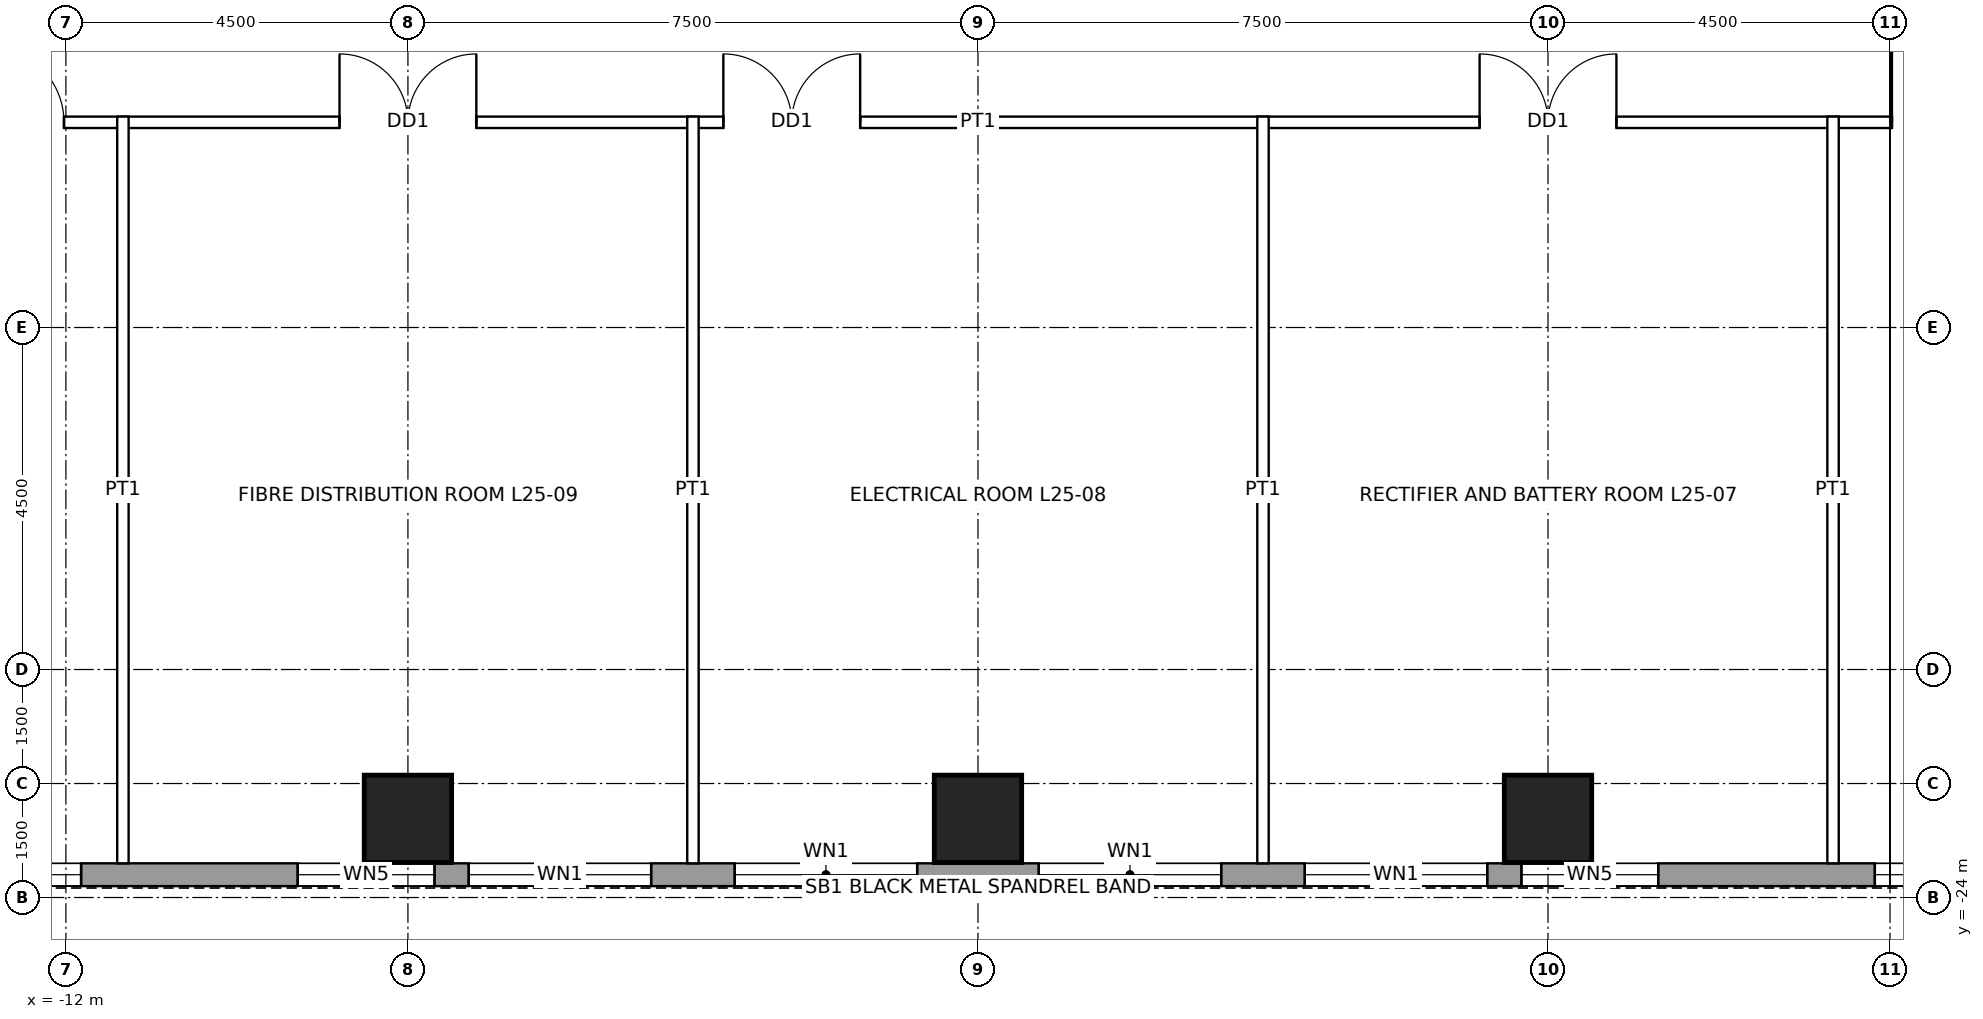
"""IFC4 building model, lengths in metres.
Left out: names, types, materials, properties, quantities, classifications, styles, units other than length and angle.
Written with IfcOpenShell. Run it as: python <this file> out.ifc"""

import sys

from ifc_helpers import new_model, si_unit, direction, frame, frame_2d, origin, origin_2d, place, context, subcontext, project, spatial, rectangle, hollow_rectangle, extrude, element, fill, save


model = new_model("IFC4")
c1 = context("Model", 3, precision=1e-05, world=origin(), true_north=direction((0.0, 1.0)))
c2 = subcontext(c1, "Body", "Model", "MODEL_VIEW")
j1 = project(units=[si_unit("LENGTHUNIT", "METRE"), si_unit("PLANEANGLEUNIT", "RADIAN")], contexts=[c1])
p1 = place(None, origin())
s1 = spatial("IfcSite", under=j1, at=p1, CompositionType="ELEMENT")
p2 = place(p1, origin())
s2 = spatial("IfcBuilding", under=s1, at=p2, CompositionType="ELEMENT")
p3 = place(p2, frame((0.0, 0.0, 126.9)))
s3 = spatial("IfcBuildingStorey", under=s2, at=p3, CompositionType="ELEMENT", Elevation=126.9)
for number, where, z_axis, x_axis in (
    (1, (7.5, -22.965, 0.0), (0.0, 0.0, 1.0), (1.0, 0.0, 0.0)),
    (2, (0.0, -22.965, 0.0), (0.0, 0.0, 1.0), (1.0, 0.0, 0.0)),
    (3, (-7.5, -22.965, 0.0), (0.0, 0.0, 1.0), (1.0, 0.0, 0.0)),
):
    element("IfcColumn", number, at=place(p3, frame(where, z_axis=z_axis, x_axis=x_axis)), inside=s3, PredefinedType="COLUMN", context=c2, shape_type="SweptSolid", body=[
        extrude(hollow_rectangle(XDim=1.15, YDim=1.15, WallThickness=0.075, at=origin_2d()), origin(), (0.0, 0.0, 1.0), 4.5),
    ])
p4 = place(p3, frame((16.2, -23.7, 0.0), z_axis=(0.0, 0.0, 1.0), x_axis=(-1.0, 0.0, 0.0)))
e4 = element("IfcWall", 4, at=p4, inside=s3, PredefinedType="SOLIDWALL", context=c2, shape_type="SweptSolid", body=[
    extrude(rectangle(XDim=32.4, YDim=0.3, at=frame_2d((16.2, 0.0))), origin(), (0.0, 0.0, 1.0), 4.3),
])
p5 = place(p4, frame((2.0, 0.0, 1.0)))
e5 = element("IfcOpeningElement", 5, at=p5, cuts=e4, PredefinedType="OPENING", context=c2, shape_type="SweptSolid", body=[
    extrude(rectangle(XDim=2.4, YDim=1.2, at=frame_2d((1.2, 0.6))), frame((0.0, 0.16, 0.0), z_axis=(0.0, -1.0, 0.0), x_axis=(1.0, 0.0, 0.0)), (0.0, 0.0, 1.0), 0.32),
])
p6 = place(p4, frame((7.25, 0.0, 1.0)))
e6 = element("IfcOpeningElement", 6, at=p6, cuts=e4, PredefinedType="OPENING", context=c2, shape_type="SweptSolid", body=[
    extrude(rectangle(XDim=1.8, YDim=1.2, at=frame_2d((0.9, 0.6))), frame((0.0, 0.16, 0.0), z_axis=(0.0, -1.0, 0.0), x_axis=(1.0, 0.0, 0.0)), (0.0, 0.0, 1.0), 0.32),
])
p7 = place(p4, frame((9.5, 0.0, 1.0)))
e7 = element("IfcOpeningElement", 7, at=p7, cuts=e4, PredefinedType="OPENING", context=c2, shape_type="SweptSolid", body=[
    extrude(rectangle(XDim=2.4, YDim=1.2, at=frame_2d((1.2, 0.6))), frame((0.0, 0.16, 0.0), z_axis=(0.0, -1.0, 0.0), x_axis=(1.0, 0.0, 0.0)), (0.0, 0.0, 1.0), 0.32),
])
p8 = place(p4, frame((13.0, 0.0, 1.0)))
e8 = element("IfcOpeningElement", 8, at=p8, cuts=e4, PredefinedType="OPENING", context=c2, shape_type="SweptSolid", body=[
    extrude(rectangle(XDim=2.4, YDim=1.2, at=frame_2d((1.2, 0.6))), frame((0.0, 0.16, 0.0), z_axis=(0.0, -1.0, 0.0), x_axis=(1.0, 0.0, 0.0)), (0.0, 0.0, 1.0), 0.32),
])
p9 = place(p4, frame((17.0, 0.0, 1.0)))
e9 = element("IfcOpeningElement", 9, at=p9, cuts=e4, PredefinedType="OPENING", context=c2, shape_type="SweptSolid", body=[
    extrude(rectangle(XDim=2.4, YDim=1.2, at=frame_2d((1.2, 0.6))), frame((0.0, 0.16, 0.0), z_axis=(0.0, -1.0, 0.0), x_axis=(1.0, 0.0, 0.0)), (0.0, 0.0, 1.0), 0.32),
])
p10 = place(p4, frame((20.5, 0.0, 1.0)))
e10 = element("IfcOpeningElement", 10, at=p10, cuts=e4, PredefinedType="OPENING", context=c2, shape_type="SweptSolid", body=[
    extrude(rectangle(XDim=2.4, YDim=1.2, at=frame_2d((1.2, 0.6))), frame((0.0, 0.16, 0.0), z_axis=(0.0, -1.0, 0.0), x_axis=(1.0, 0.0, 0.0)), (0.0, 0.0, 1.0), 0.32),
])
p11 = place(p4, frame((23.35, 0.0, 1.0)))
e11 = element("IfcOpeningElement", 11, at=p11, cuts=e4, PredefinedType="OPENING", context=c2, shape_type="SweptSolid", body=[
    extrude(rectangle(XDim=1.8, YDim=1.2, at=frame_2d((0.9, 0.6))), frame((0.0, 0.16, 0.0), z_axis=(0.0, -1.0, 0.0), x_axis=(1.0, 0.0, 0.0)), (0.0, 0.0, 1.0), 0.32),
])
p12 = place(p4, frame((28.0, 0.0, 1.0)))
e12 = element("IfcOpeningElement", 12, at=p12, cuts=e4, PredefinedType="OPENING", context=c2, shape_type="SweptSolid", body=[
    extrude(rectangle(XDim=2.4, YDim=1.2, at=frame_2d((1.2, 0.6))), frame((0.0, 0.16, 0.0), z_axis=(0.0, -1.0, 0.0), x_axis=(1.0, 0.0, 0.0)), (0.0, 0.0, 1.0), 0.32),
])
p13 = place(p3, frame((-13.875, -13.8, 0.0), z_axis=(0.0, 0.0, 1.0), x_axis=(1.0, 0.0, 0.0)))
e13 = element("IfcWall", 13, at=p13, inside=s3, PredefinedType="PARTITIONING", context=c2, shape_type="SweptSolid", body=[
    extrude(rectangle(XDim=27.75, YDim=0.15, at=frame_2d((13.875, 0.0))), origin(), (0.0, 0.0, 1.0), 4.3),
])
p14 = place(p13, frame((20.475, 0.0, 0.0)))
e14 = element("IfcOpeningElement", 14, at=p14, cuts=e13, PredefinedType="OPENING", context=c2, shape_type="SweptSolid", body=[
    extrude(rectangle(XDim=1.8, YDim=2.4, at=frame_2d((0.9, 1.2))), frame((0.0, 0.085, 0.0), z_axis=(0.0, -1.0, 0.0), x_axis=(1.0, 0.0, 0.0)), (0.0, 0.0, 1.0), 0.17),
])
p15 = place(p13, frame((10.525, 0.0, 0.0)))
e15 = element("IfcOpeningElement", 15, at=p15, cuts=e13, PredefinedType="OPENING", context=c2, shape_type="SweptSolid", body=[
    extrude(rectangle(XDim=1.8, YDim=2.4, at=frame_2d((0.9, 1.2))), frame((0.0, 0.085, 0.0), z_axis=(0.0, -1.0, 0.0), x_axis=(1.0, 0.0, 0.0)), (0.0, 0.0, 1.0), 0.17),
])
p16 = place(p13, frame((5.475, 0.0, 0.0)))
e16 = element("IfcOpeningElement", 16, at=p16, cuts=e13, PredefinedType="OPENING", context=c2, shape_type="SweptSolid", body=[
    extrude(rectangle(XDim=1.8, YDim=2.4, at=frame_2d((0.9, 1.2))), frame((0.0, 0.085, 0.0), z_axis=(0.0, -1.0, 0.0), x_axis=(1.0, 0.0, 0.0)), (0.0, 0.0, 1.0), 0.17),
])
p17 = place(p13, frame((25.9, 0.0, 0.0)))
e17 = element("IfcOpeningElement", 17, at=p17, cuts=e13, PredefinedType="OPENING", context=c2, shape_type="SweptSolid", body=[
    extrude(rectangle(XDim=1.0, YDim=2.1, at=frame_2d((0.5, 1.05))), frame((0.0, 0.085, 0.0), z_axis=(0.0, -1.0, 0.0), x_axis=(1.0, 0.0, 0.0)), (0.0, 0.0, 1.0), 0.17),
])
p18 = place(p13, frame((0.85, 0.0, 0.0)))
e18 = element("IfcOpeningElement", 18, at=p18, cuts=e13, PredefinedType="OPENING", context=c2, shape_type="SweptSolid", body=[
    extrude(rectangle(XDim=1.0, YDim=2.1, at=frame_2d((0.5, 1.05))), frame((0.0, 0.085, 0.0), z_axis=(0.0, -1.0, 0.0), x_axis=(1.0, 0.0, 0.0)), (0.0, 0.0, 1.0), 0.17),
])
for number, where, z_axis, x_axis in (
    (19, (-11.25, -23.55, 0.0), (0.0, 0.0, 1.0), (0.0, 1.0, 0.0)),
    (20, (-3.75, -23.55, 0.0), (0.0, 0.0, 1.0), (0.0, 1.0, 0.0)),
    (21, (3.75, -23.55, 0.0), (0.0, 0.0, 1.0), (0.0, 1.0, 0.0)),
    (22, (11.25, -23.55, 0.0), (0.0, 0.0, 1.0), (0.0, 1.0, 0.0)),
):
    element("IfcWall", number, at=place(p3, frame(where, z_axis=z_axis, x_axis=x_axis)), inside=s3, PredefinedType="PARTITIONING", context=c2, shape_type="SweptSolid", body=[
        extrude(rectangle(XDim=9.825, YDim=0.15, at=frame_2d((4.913, 0.0))), origin(), (0.0, 0.0, 1.0), 3.431),
    ])
p19 = place(p5, origin())
e23 = element("IfcWindow", 23, at=p19, inside=s3, PartitioningType="SINGLE_PANEL", PredefinedType="WINDOW", context=c2, shape_type="SweptSolid", body=[
    extrude(rectangle(XDim=2.4, YDim=1.2, at=frame_2d((1.2, 0.6))), frame((0.0, 0.03, 0.0), z_axis=(0.0, -1.0, 0.0), x_axis=(1.0, 0.0, 0.0)), (0.0, 0.0, 1.0), 0.06),
])
fill(e5, e23)
p20 = place(p6, origin())
e24 = element("IfcWindow", 24, at=p20, inside=s3, PartitioningType="SINGLE_PANEL", PredefinedType="WINDOW", context=c2, shape_type="SweptSolid", body=[
    extrude(rectangle(XDim=1.8, YDim=1.2, at=frame_2d((0.9, 0.6))), frame((0.0, 0.03, 0.0), z_axis=(0.0, -1.0, 0.0), x_axis=(1.0, 0.0, 0.0)), (0.0, 0.0, 1.0), 0.06),
])
fill(e6, e24)
p21 = place(p7, origin())
e25 = element("IfcWindow", 25, at=p21, inside=s3, PartitioningType="SINGLE_PANEL", PredefinedType="WINDOW", context=c2, shape_type="SweptSolid", body=[
    extrude(rectangle(XDim=2.4, YDim=1.2, at=frame_2d((1.2, 0.6))), frame((0.0, 0.03, 0.0), z_axis=(0.0, -1.0, 0.0), x_axis=(1.0, 0.0, 0.0)), (0.0, 0.0, 1.0), 0.06),
])
fill(e7, e25)
p22 = place(p8, origin())
e26 = element("IfcWindow", 26, at=p22, inside=s3, PartitioningType="SINGLE_PANEL", PredefinedType="WINDOW", context=c2, shape_type="SweptSolid", body=[
    extrude(rectangle(XDim=2.4, YDim=1.2, at=frame_2d((1.2, 0.6))), frame((0.0, 0.03, 0.0), z_axis=(0.0, -1.0, 0.0), x_axis=(1.0, 0.0, 0.0)), (0.0, 0.0, 1.0), 0.06),
])
fill(e8, e26)
p23 = place(p9, origin())
e27 = element("IfcWindow", 27, at=p23, inside=s3, PartitioningType="SINGLE_PANEL", PredefinedType="WINDOW", context=c2, shape_type="SweptSolid", body=[
    extrude(rectangle(XDim=2.4, YDim=1.2, at=frame_2d((1.2, 0.6))), frame((0.0, 0.03, 0.0), z_axis=(0.0, -1.0, 0.0), x_axis=(1.0, 0.0, 0.0)), (0.0, 0.0, 1.0), 0.06),
])
fill(e9, e27)
p24 = place(p10, origin())
e28 = element("IfcWindow", 28, at=p24, inside=s3, PartitioningType="SINGLE_PANEL", PredefinedType="WINDOW", context=c2, shape_type="SweptSolid", body=[
    extrude(rectangle(XDim=2.4, YDim=1.2, at=frame_2d((1.2, 0.6))), frame((0.0, 0.03, 0.0), z_axis=(0.0, -1.0, 0.0), x_axis=(1.0, 0.0, 0.0)), (0.0, 0.0, 1.0), 0.06),
])
fill(e10, e28)
p25 = place(p11, origin())
e29 = element("IfcWindow", 29, at=p25, inside=s3, PartitioningType="SINGLE_PANEL", PredefinedType="WINDOW", context=c2, shape_type="SweptSolid", body=[
    extrude(rectangle(XDim=1.8, YDim=1.2, at=frame_2d((0.9, 0.6))), frame((0.0, 0.03, 0.0), z_axis=(0.0, -1.0, 0.0), x_axis=(1.0, 0.0, 0.0)), (0.0, 0.0, 1.0), 0.06),
])
fill(e11, e29)
p26 = place(p12, origin())
e30 = element("IfcWindow", 30, at=p26, inside=s3, PartitioningType="SINGLE_PANEL", PredefinedType="WINDOW", context=c2, shape_type="SweptSolid", body=[
    extrude(rectangle(XDim=2.4, YDim=1.2, at=frame_2d((1.2, 0.6))), frame((0.0, 0.03, 0.0), z_axis=(0.0, -1.0, 0.0), x_axis=(1.0, 0.0, 0.0)), (0.0, 0.0, 1.0), 0.06),
])
fill(e12, e30)
p27 = place(p14, origin())
e31 = element("IfcDoor", 31, at=p27, inside=s3, OperationType="DOUBLE_DOOR_SINGLE_SWING", PredefinedType="DOOR", context=c2, shape_type="SweptSolid", body=[
    extrude(rectangle(XDim=1.8, YDim=2.4, at=frame_2d((0.9, 1.2))), frame((0.0, 0.025, 0.0), z_axis=(0.0, -1.0, 0.0), x_axis=(1.0, 0.0, 0.0)), (0.0, 0.0, 1.0), 0.05),
])
fill(e14, e31)
p28 = place(p15, origin())
e32 = element("IfcDoor", 32, at=p28, inside=s3, OperationType="DOUBLE_DOOR_SINGLE_SWING", PredefinedType="DOOR", context=c2, shape_type="SweptSolid", body=[
    extrude(rectangle(XDim=1.8, YDim=2.4, at=frame_2d((0.9, 1.2))), frame((0.0, 0.025, 0.0), z_axis=(0.0, -1.0, 0.0), x_axis=(1.0, 0.0, 0.0)), (0.0, 0.0, 1.0), 0.05),
])
fill(e15, e32)
p29 = place(p16, origin())
e33 = element("IfcDoor", 33, at=p29, inside=s3, OperationType="DOUBLE_DOOR_SINGLE_SWING", PredefinedType="DOOR", context=c2, shape_type="SweptSolid", body=[
    extrude(rectangle(XDim=1.8, YDim=2.4, at=frame_2d((0.9, 1.2))), frame((0.0, 0.025, 0.0), z_axis=(0.0, -1.0, 0.0), x_axis=(1.0, 0.0, 0.0)), (0.0, 0.0, 1.0), 0.05),
])
fill(e16, e33)
p30 = place(p17, origin())
e34 = element("IfcDoor", 34, at=p30, inside=s3, OperationType="SINGLE_SWING_LEFT", PredefinedType="DOOR", context=c2, shape_type="SweptSolid", body=[
    extrude(rectangle(XDim=1.0, YDim=2.1, at=frame_2d((0.5, 1.05))), frame((0.0, 0.025, 0.0), z_axis=(0.0, -1.0, 0.0), x_axis=(1.0, 0.0, 0.0)), (0.0, 0.0, 1.0), 0.05),
])
fill(e17, e34)
p31 = place(p18, origin())
e35 = element("IfcDoor", 35, at=p31, inside=s3, OperationType="SINGLE_SWING_LEFT", PredefinedType="DOOR", context=c2, shape_type="SweptSolid", body=[
    extrude(rectangle(XDim=1.0, YDim=2.1, at=frame_2d((0.5, 1.05))), frame((0.0, 0.025, 0.0), z_axis=(0.0, -1.0, 0.0), x_axis=(1.0, 0.0, 0.0)), (0.0, 0.0, 1.0), 0.05),
])
fill(e18, e35)
save(model, sys.argv[1])
